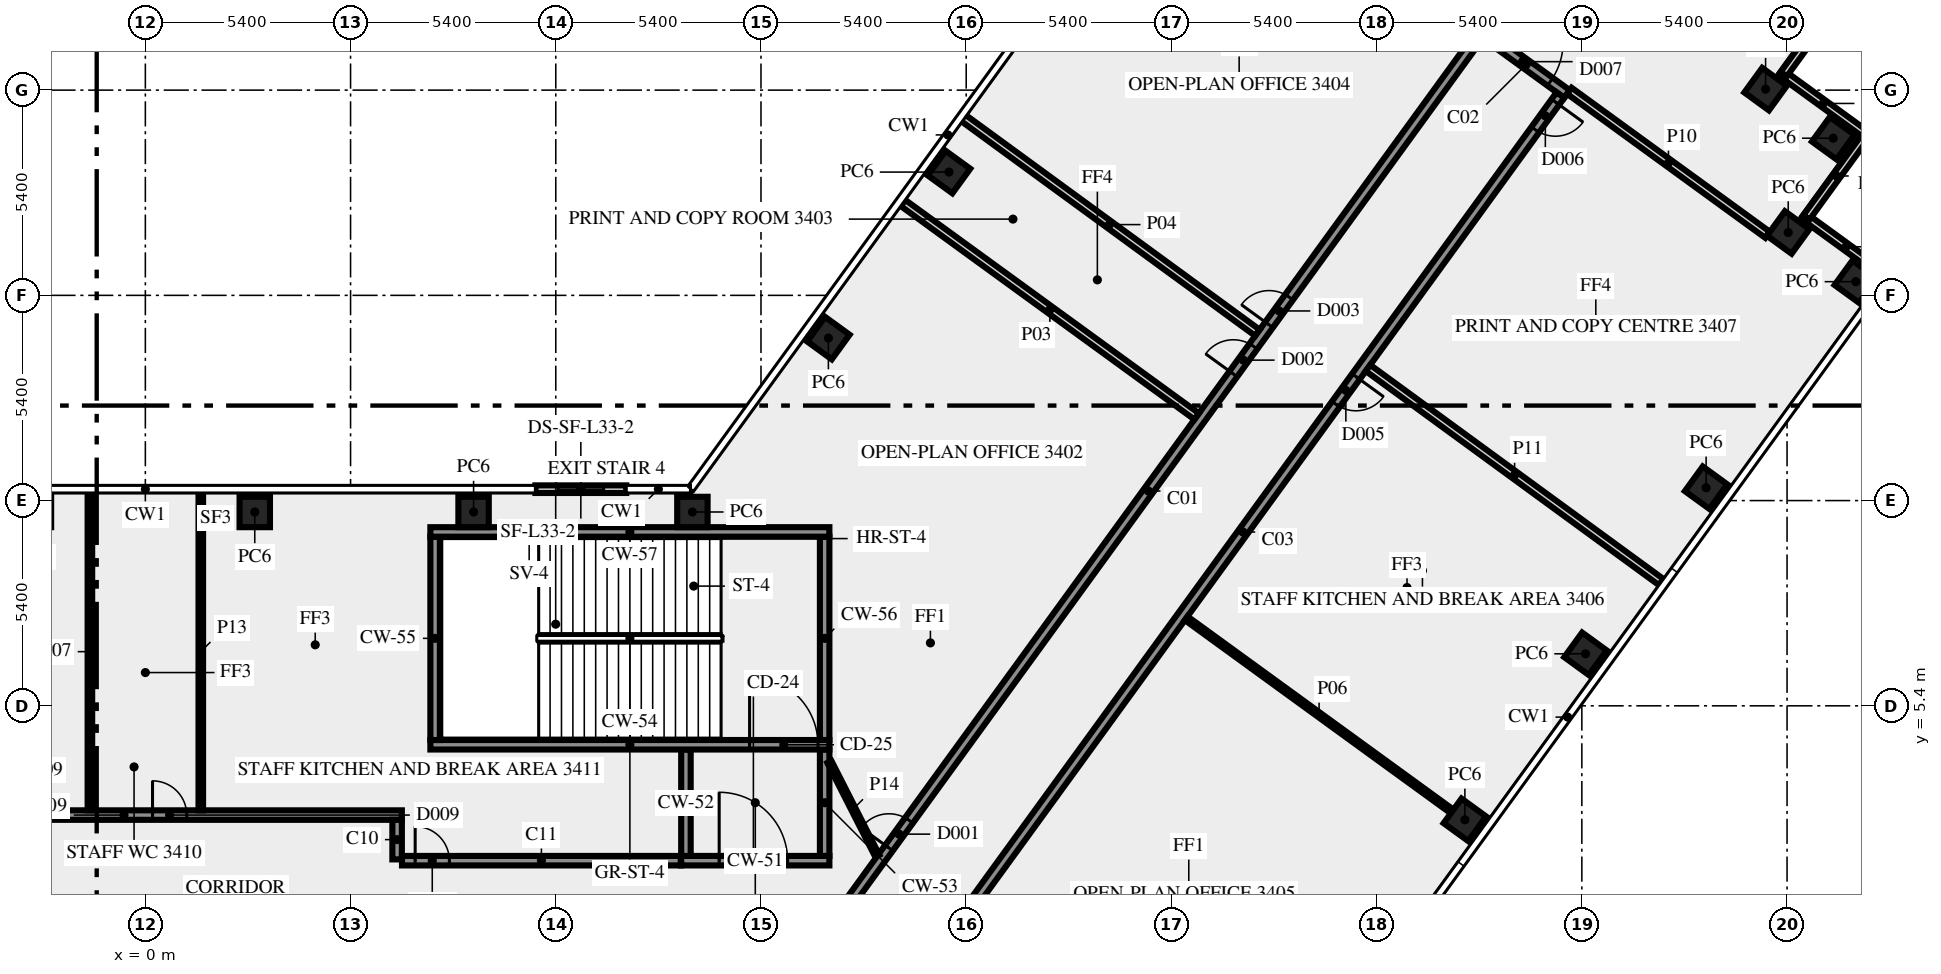
"""IFC4 building model, lengths in metres.
Left out: names, types, materials, properties, quantities, classifications, styles, units other than length and angle.
Written with IfcOpenShell. Run it as: python <this file> out.ifc"""

import sys

from ifc_helpers import new_model, si_unit, direction, frame, frame_2d, origin, origin_2d, place, context, subcontext, project, spatial, rectangle, extrude, element, fill, save


model = new_model("IFC4")
c1 = context("Model", 3, precision=1e-05, world=origin(), true_north=direction((0.0, 1.0)))
c2 = subcontext(c1, "Body", "Model", "MODEL_VIEW")
j1 = project(units=[si_unit("LENGTHUNIT", "METRE"), si_unit("PLANEANGLEUNIT", "RADIAN")], contexts=[c1])
p1 = place(None, origin())
s1 = spatial("IfcSite", under=j1, at=p1, CompositionType="ELEMENT")
p2 = place(p1, origin())
s2 = spatial("IfcBuilding", under=s1, at=p2, CompositionType="ELEMENT")
p3 = place(p2, frame((0.0, 0.0, 148.0)))
s3 = spatial("IfcBuildingStorey", under=s2, at=p3, CompositionType="ELEMENT", Elevation=148.0)
for number, where, z_axis, x_axis in (
    (1, (34.722, 2.4, 0.0), (0.0, 0.0, 1.0), (0.588, 0.809, 0.0)),
    (2, (37.896, 6.769, 0.0), (0.0, 0.0, 1.0), (0.588, 0.809, 0.0)),
    (3, (41.07, 11.137, 0.0), (0.0, 0.0, 1.0), (0.588, 0.809, 0.0)),
    (4, (45.01, 16.56, 0.0), (0.0, 0.0, 1.0), (0.588, 0.809, 0.0)),
    (5, (43.231, 17.854, 0.0), (0.0, 0.0, 1.0), (0.588, 0.809, 0.0)),
    (6, (44.415, 20.335, 0.0), (0.0, 0.0, 1.0), (0.588, 0.809, 0.0)),
    (7, (42.635, 21.626, 0.0), (0.0, 0.0, 1.0), (-0.809, 0.588, 0.0)),
    (8, (21.147, 19.444, 0.0), (0.0, 0.0, 1.0), (-0.588, -0.809, 0.0)),
    (9, (17.974, 15.075, 0.0), (0.0, 0.0, 1.0), (-0.588, -0.809, 0.0)),
    (10, (14.395, 10.5, 0.0), (0.0, 0.0, 1.0), (-1.0, 0.0, 0.0)),
    (11, (8.637, 10.5, 0.0), (0.0, 0.0, 1.0), (-1.0, 0.0, 0.0)),
    (12, (2.879, 10.5, 0.0), (0.0, 0.0, 1.0), (-1.0, 0.0, 0.0)),
):
    element("IfcColumn", number, at=place(p3, frame(where, z_axis=z_axis, x_axis=x_axis)), inside=s3, PredefinedType="COLUMN", context=c2, shape_type="SweptSolid", body=[
        extrude(rectangle(XDim=0.8, YDim=0.8, at=origin_2d()), origin(), (0.0, 0.0, 1.0), 3.65),
    ])
for number, where, z_axis, x_axis in (
    (13, (45.842, 16.685, 0.0), (0.0, 0.0, 1.0), (-0.809, 0.588, 0.0)),
    (14, (43.709, 18.249, 0.0), (0.0, 0.0, 1.0), (0.588, 0.809, 0.0)),
    (15, (45.245, 20.456, 0.0), (0.0, 0.0, 1.0), (-0.809, 0.588, 0.0)),
    (16, (43.113, 22.02, 0.0), (0.0, 0.0, 1.0), (0.588, 0.809, 0.0)),
):
    element("IfcWall", number, at=place(p3, frame(where, z_axis=z_axis, x_axis=x_axis)), inside=s3, PredefinedType="SOLIDWALL", context=c2, shape_type="SweptSolid", body=[
        extrude(rectangle(XDim=2.7, YDim=0.2, at=frame_2d((1.35, 0.0))), origin(), (0.0, 0.0, 1.0), 3.65),
    ])
p4 = place(p3, frame((12.655, 11.1, 0.0), z_axis=(0.0, 0.0, 1.0), x_axis=(-1.0, 0.0, 0.0)))
e17 = element("IfcWall", 17, at=p4, inside=s3, PredefinedType="SOLIDWALL", context=c2, shape_type="SweptSolid", body=[
    extrude(rectangle(XDim=2.392, YDim=0.2, at=frame_2d((1.196, 0.0))), origin(), (0.0, 0.0, 1.0), 3.65),
])
p5 = place(p4, frame((0.596, 0.0, 1.0)))
e18 = element("IfcOpeningElement", 18, at=p5, cuts=e17, PredefinedType="OPENING", context=c2, shape_type="SweptSolid", body=[
    extrude(rectangle(XDim=1.2, YDim=1.2, at=frame_2d((0.6, 0.6))), frame((0.0, 0.11, 0.0), z_axis=(0.0, -1.0, 0.0), x_axis=(1.0, 0.0, 0.0)), (0.0, 0.0, 1.0), 0.22),
])
p6 = place(p3, frame((14.1, 1.325, 0.0), z_axis=(0.0, 0.0, 1.0), x_axis=(1.0, 0.0, 0.0)))
e19 = element("IfcWall", 19, at=p6, inside=s3, PredefinedType="SHEAR", context=c2, shape_type="SweptSolid", body=[
    extrude(rectangle(XDim=3.9, YDim=0.25, at=frame_2d((1.95, 0.0))), origin(), (0.0, 0.0, 1.0), 3.65),
])
p7 = place(p6, frame((1.0, 0.0, 0.0)))
e20 = element("IfcOpeningElement", 20, at=p7, cuts=e19, PredefinedType="OPENING", context=c2, shape_type="SweptSolid", body=[
    extrude(rectangle(XDim=1.8, YDim=2.1, at=frame_2d((0.9, 1.05))), frame((0.0, 0.135, 0.0), z_axis=(0.0, -1.0, 0.0), x_axis=(1.0, 0.0, 0.0)), (0.0, 0.0, 1.0), 0.27),
])
for number, where, z_axis, x_axis in (
    (21, (14.225, 1.45, 0.0), (0.0, 0.0, 1.0), (0.0, 1.0, 0.0)),
    (22, (17.875, 1.45, 0.0), (0.0, 0.0, 1.0), (0.0, 1.0, 0.0)),
):
    element("IfcWall", number, at=place(p3, frame(where, z_axis=z_axis, x_axis=x_axis)), inside=s3, PredefinedType="SHEAR", context=c2, shape_type="SweptSolid", body=[
        extrude(rectangle(XDim=2.8, YDim=0.25, at=frame_2d((1.4, 0.0))), origin(), (0.0, 0.0, 1.0), 3.65),
    ])
p8 = place(p3, frame((7.5, 4.375, 0.0), z_axis=(0.0, 0.0, 1.0), x_axis=(1.0, 0.0, 0.0)))
e23 = element("IfcWall", 23, at=p8, inside=s3, PredefinedType="SHEAR", context=c2, shape_type="SweptSolid", body=[
    extrude(rectangle(XDim=10.5, YDim=0.25, at=frame_2d((5.25, 0.0))), origin(), (0.0, 0.0, 1.0), 3.65),
])
p9 = place(p8, frame((8.4, 0.0, 0.0)))
e24 = element("IfcOpeningElement", 24, at=p9, cuts=e23, PredefinedType="OPENING", context=c2, shape_type="SweptSolid", body=[
    extrude(rectangle(XDim=1.8, YDim=2.1, at=frame_2d((0.9, 1.05))), frame((0.0, 0.135, 0.0), z_axis=(0.0, -1.0, 0.0), x_axis=(1.0, 0.0, 0.0)), (0.0, 0.0, 1.0), 0.27),
])
for number, where, z_axis, x_axis in (
    (25, (7.625, 4.5, 0.0), (0.0, 0.0, 1.0), (0.0, 1.0, 0.0)),
    (26, (17.875, 4.5, 0.0), (0.0, 0.0, 1.0), (0.0, 1.0, 0.0)),
):
    element("IfcWall", number, at=place(p3, frame(where, z_axis=z_axis, x_axis=x_axis)), inside=s3, PredefinedType="SHEAR", context=c2, shape_type="SweptSolid", body=[
        extrude(rectangle(XDim=5.35, YDim=0.25, at=frame_2d((2.675, 0.0))), origin(), (0.0, 0.0, 1.0), 3.65),
    ])
p10 = place(p3, frame((7.5, 9.975, 0.0), z_axis=(0.0, 0.0, 1.0), x_axis=(1.0, 0.0, 0.0)))
e27 = element("IfcWall", 27, at=p10, inside=s3, PredefinedType="SHEAR", context=c2, shape_type="SweptSolid", body=[
    extrude(rectangle(XDim=10.5, YDim=0.25, at=frame_2d((5.25, 0.0))), origin(), (0.0, 0.0, 1.0), 3.65),
])
p11 = place(p10, frame((2.0, 0.0, 1.0)))
e28 = element("IfcOpeningElement", 28, at=p11, cuts=e27, PredefinedType="OPENING", context=c2, shape_type="SweptSolid", body=[
    extrude(rectangle(XDim=1.2, YDim=1.2, at=frame_2d((0.6, 0.6))), frame((0.0, 0.135, 0.0), z_axis=(0.0, -1.0, 0.0), x_axis=(1.0, 0.0, 0.0)), (0.0, 0.0, 1.0), 0.27),
])
p12 = place(p3, frame((17.545, -1.125, 0.0), z_axis=(0.0, 0.0, 1.0), x_axis=(0.587786330937, 0.809016210693, 0.0)))
e29 = element("IfcWall", 29, at=p12, inside=s3, PredefinedType="SOLIDWALL", context=c2, shape_type="SweptSolid", body=[
    extrude(rectangle(XDim=30.103, YDim=0.25, at=frame_2d((15.052, 0.0))), origin(), (0.0, 0.0, 1.0), 3.65),
])
p13 = place(p12, frame((3.441, 0.0, 0.0)))
e30 = element("IfcOpeningElement", 30, at=p13, cuts=e29, PredefinedType="OPENING", context=c2, shape_type="SweptSolid", body=[
    extrude(rectangle(XDim=0.9, YDim=2.1, at=frame_2d((0.45, 1.05))), frame((0.0, 0.135, 0.0), z_axis=(0.0, -1.0, 0.0), x_axis=(1.0, 0.0, 0.0)), (0.0, 0.0, 1.0), 0.27),
])
p14 = place(p12, frame((20.457, 0.0, 0.0)))
e31 = element("IfcOpeningElement", 31, at=p14, cuts=e29, PredefinedType="OPENING", context=c2, shape_type="SweptSolid", body=[
    extrude(rectangle(XDim=0.9, YDim=2.1, at=frame_2d((0.45, 1.05))), frame((0.0, 0.135, 0.0), z_axis=(0.0, -1.0, 0.0), x_axis=(1.0, 0.0, 0.0)), (0.0, 0.0, 1.0), 0.27),
])
p15 = place(p12, frame((18.858, 0.0, 0.0)))
e32 = element("IfcOpeningElement", 32, at=p15, cuts=e29, PredefinedType="OPENING", context=c2, shape_type="SweptSolid", body=[
    extrude(rectangle(XDim=0.9, YDim=2.1, at=frame_2d((0.45, 1.05))), frame((0.0, 0.135, 0.0), z_axis=(0.0, -1.0, 0.0), x_axis=(1.0, 0.0, 0.0)), (0.0, 0.0, 1.0), 0.27),
])
p16 = place(p3, frame((35.267, 23.054, 0.0), z_axis=(0.0, 0.0, 1.0), x_axis=(0.809038743598, -0.587755315891, 0.0)))
e33 = element("IfcWall", 33, at=p16, inside=s3, PredefinedType="SOLIDWALL", context=c2, shape_type="SweptSolid", body=[
    extrude(rectangle(XDim=2.65, YDim=0.25, at=frame_2d((1.325, 0.0))), origin(), (0.0, 0.0, 1.0), 3.65),
])
p17 = place(p16, frame((0.3, 0.0, 0.0)))
e34 = element("IfcOpeningElement", 34, at=p17, cuts=e33, PredefinedType="OPENING", context=c2, shape_type="SweptSolid", body=[
    extrude(rectangle(XDim=1.8, YDim=2.1, at=frame_2d((0.9, 1.05))), frame((0.0, 0.135, 0.0), z_axis=(0.0, -1.0, 0.0), x_axis=(1.0, 0.0, 0.0)), (0.0, 0.0, 1.0), 0.27),
])
p18 = place(p3, frame((37.236, 21.469, 0.0), z_axis=(0.0, 0.0, 1.0), x_axis=(-0.58778344073, -0.809018310549, 0.0)))
e35 = element("IfcWall", 35, at=p18, inside=s3, PredefinedType="SOLIDWALL", context=c2, shape_type="SweptSolid", body=[
    extrude(rectangle(XDim=28.42, YDim=0.25, at=frame_2d((14.21, 0.0))), origin(), (0.0, 0.0, 1.0), 3.65),
])
p19 = place(p18, frame((26.988, 0.0, 0.0)))
e36 = element("IfcOpeningElement", 36, at=p19, cuts=e35, PredefinedType="OPENING", context=c2, shape_type="SweptSolid", body=[
    extrude(rectangle(XDim=0.9, YDim=2.1, at=frame_2d((0.45, 1.05))), frame((0.0, 0.135, 0.0), z_axis=(0.0, -1.0, 0.0), x_axis=(1.0, 0.0, 0.0)), (0.0, 0.0, 1.0), 0.27),
])
p20 = place(p18, frame((0.224, 0.0, 0.0)))
e37 = element("IfcOpeningElement", 37, at=p20, cuts=e35, PredefinedType="OPENING", context=c2, shape_type="SweptSolid", body=[
    extrude(rectangle(XDim=0.9, YDim=2.1, at=frame_2d((0.45, 1.05))), frame((0.0, 0.135, 0.0), z_axis=(0.0, -1.0, 0.0), x_axis=(1.0, 0.0, 0.0)), (0.0, 0.0, 1.0), 0.27),
])
p21 = place(p18, frame((9.155, 0.0, 0.0)))
e38 = element("IfcOpeningElement", 38, at=p21, cuts=e35, PredefinedType="OPENING", context=c2, shape_type="SweptSolid", body=[
    extrude(rectangle(XDim=0.9, YDim=2.1, at=frame_2d((0.45, 1.05))), frame((0.0, 0.135, 0.0), z_axis=(0.0, -1.0, 0.0), x_axis=(1.0, 0.0, 0.0)), (0.0, 0.0, 1.0), 0.27),
])
p22 = place(p3, frame((-4.5, 2.525, 0.0), z_axis=(0.0, 0.0, 1.0), x_axis=(1.0, 0.0, 0.0)))
e39 = element("IfcWall", 39, at=p22, inside=s3, PredefinedType="SOLIDWALL", context=c2, shape_type="SweptSolid", body=[
    extrude(rectangle(XDim=11.25, YDim=0.25, at=frame_2d((5.625, 0.0))), origin(), (0.0, 0.0, 1.0), 3.65),
])
p23 = place(p22, frame((4.689, 0.0, 0.0)))
e40 = element("IfcOpeningElement", 40, at=p23, cuts=e39, PredefinedType="OPENING", context=c2, shape_type="SweptSolid", body=[
    extrude(rectangle(XDim=0.9, YDim=2.1, at=frame_2d((0.45, 1.05))), frame((0.0, 0.135, 0.0), z_axis=(0.0, -1.0, 0.0), x_axis=(1.0, 0.0, 0.0)), (0.0, 0.0, 1.0), 0.27),
])
p24 = place(p3, frame((6.625, 2.4, 0.0), z_axis=(0.0, 0.0, 1.0), x_axis=(0.0, -1.0, 0.0)))
e41 = element("IfcWall", 41, at=p24, inside=s3, PredefinedType="SOLIDWALL", context=c2, shape_type="SweptSolid", body=[
    extrude(rectangle(XDim=1.041, YDim=0.25, at=frame_2d((0.521, 0.0))), origin(), (0.0, 0.0, 1.0), 3.65),
])
p25 = place(p3, frame((6.754, 1.325, 0.0), z_axis=(0.0, 0.0, 1.0), x_axis=(1.0, 0.0, 0.0)))
e42 = element("IfcWall", 42, at=p25, inside=s3, PredefinedType="SOLIDWALL", context=c2, shape_type="SweptSolid", body=[
    extrude(rectangle(XDim=7.336, YDim=0.25, at=frame_2d((3.668, 0.0))), origin(), (0.0, 0.0, 1.0), 3.65),
])
p26 = place(p25, frame((0.346, 0.0, 0.0)))
e43 = element("IfcOpeningElement", 43, at=p26, cuts=e42, PredefinedType="OPENING", context=c2, shape_type="SweptSolid", body=[
    extrude(rectangle(XDim=0.9, YDim=2.1, at=frame_2d((0.45, 1.05))), frame((0.0, 0.135, 0.0), z_axis=(0.0, -1.0, 0.0), x_axis=(1.0, 0.0, 0.0)), (0.0, 0.0, 1.0), 0.27),
])
p27 = place(p3, frame((27.664, 13.016, 0.0), z_axis=(0.0, 0.0, 1.0), x_axis=(-0.80900684162, 0.587799226107, 0.0)))
e44 = element("IfcWall", 44, at=p27, inside=s3, PredefinedType="SOLIDWALL", context=c2, shape_type="SweptSolid", body=[
    extrude(rectangle(XDim=9.55, YDim=0.2, at=frame_2d((4.775, 0.0))), origin(), (0.0, 0.0, 1.0), 2.85),
])
p28 = place(p3, frame((21.469, 20.908, 0.0), z_axis=(0.0, 0.0, 1.0), x_axis=(0.807593618158, -0.589739389824, 0.0)))
e45 = element("IfcWall", 45, at=p28, inside=s3, PredefinedType="SOLIDWALL", context=c2, shape_type="SweptSolid", body=[
    extrude(rectangle(XDim=9.651, YDim=0.2, at=frame_2d((4.826, 0.0))), origin(), (0.0, 0.0, 1.0), 2.85),
])
p29 = place(p3, frame((34.383, 2.622, 0.0), z_axis=(0.0, 0.0, 1.0), x_axis=(-0.809060825193, 0.587724919617, 0.0)))
e46 = element("IfcWall", 46, at=p29, inside=s3, PredefinedType="PARTITIONING", context=c2, shape_type="SweptSolid", body=[
    extrude(rectangle(XDim=8.645, YDim=0.12, at=frame_2d((4.322, 0.0))), origin(), (0.0, 0.0, 1.0), 3.65),
])
p30 = place(p3, frame((-1.459, 2.65, 0.0), z_axis=(0.0, 0.0, 1.0), x_axis=(0.0, 1.0, 0.0)))
e47 = element("IfcWall", 47, at=p30, inside=s3, PredefinedType="PARTITIONING", context=c2, shape_type="SweptSolid", body=[
    extrude(rectangle(XDim=8.35, YDim=0.12, at=frame_2d((4.175, 0.0))), origin(), (0.0, 0.0, 1.0), 2.85),
])
p31 = place(p3, frame((42.686, 17.794, 0.0), z_axis=(0.0, 0.0, 1.0), x_axis=(-0.809017755079, 0.587784205272, 0.0)))
e48 = element("IfcWall", 48, at=p31, inside=s3, PredefinedType="SOLIDWALL", context=c2, shape_type="SweptSolid", body=[
    extrude(rectangle(XDim=6.445, YDim=0.2, at=frame_2d((3.222, 0.0))), origin(), (0.0, 0.0, 1.0), 3.65),
])
p32 = place(p3, frame((32.174, 14.288, 0.0), z_axis=(0.0, 0.0, 1.0), x_axis=(0.807664588563, -0.589642190131, 0.0)))
e49 = element("IfcWall", 49, at=p32, inside=s3, PredefinedType="SOLIDWALL", context=c2, shape_type="SweptSolid", body=[
    extrude(rectangle(XDim=9.55, YDim=0.2, at=frame_2d((4.775, 0.0))), origin(), (0.0, 0.0, 1.0), 2.85),
])
p33 = place(p3, frame((1.459, 11.0, 0.0), z_axis=(0.0, 0.0, 1.0), x_axis=(0.0, -1.0, 0.0)))
e50 = element("IfcWall", 50, at=p33, inside=s3, PredefinedType="PARTITIONING", context=c2, shape_type="SweptSolid", body=[
    extrude(rectangle(XDim=8.35, YDim=0.12, at=frame_2d((4.175, 0.0))), origin(), (0.0, 0.0, 1.0), 2.85),
])
p34 = place(p3, frame((18.0, 3.925, 0.0), z_axis=(0.0, 0.0, 1.0), x_axis=(0.453950796792, -0.891026752736, 0.0)))
e51 = element("IfcWall", 51, at=p34, inside=s3, PredefinedType="PARTITIONING", context=c2, shape_type="SweptSolid", body=[
    extrude(rectangle(XDim=2.778, YDim=0.12, at=frame_2d((1.389, 0.0))), origin(), (0.0, 0.0, 1.0), 3.65),
])
p35 = place(p5, origin())
e52 = element("IfcWindow", 52, at=p35, inside=s3, PartitioningType="SINGLE_PANEL", PredefinedType="WINDOW", context=c2, shape_type="SweptSolid", body=[
    extrude(rectangle(XDim=1.2, YDim=1.2, at=frame_2d((0.6, 0.6))), frame((0.0, 0.03, 0.0), z_axis=(0.0, -1.0, 0.0), x_axis=(1.0, 0.0, 0.0)), (0.0, 0.0, 1.0), 0.06),
])
fill(e18, e52)
p36 = place(p7, origin())
e53 = element("IfcDoor", 53, at=p36, inside=s3, OperationType="DOUBLE_DOOR_SINGLE_SWING", PredefinedType="DOOR", context=c2, shape_type="SweptSolid", body=[
    extrude(rectangle(XDim=1.8, YDim=2.1, at=frame_2d((0.9, 1.05))), frame((0.0, 0.025, 0.0), z_axis=(0.0, -1.0, 0.0), x_axis=(1.0, 0.0, 0.0)), (0.0, 0.0, 1.0), 0.05),
])
fill(e20, e53)
p37 = place(p9, origin())
e54 = element("IfcDoor", 54, at=p37, inside=s3, OperationType="DOUBLE_DOOR_SINGLE_SWING", PredefinedType="DOOR", context=c2, shape_type="SweptSolid", body=[
    extrude(rectangle(XDim=1.8, YDim=2.1, at=frame_2d((0.9, 1.05))), frame((0.0, 0.025, 0.0), z_axis=(0.0, -1.0, 0.0), x_axis=(1.0, 0.0, 0.0)), (0.0, 0.0, 1.0), 0.05),
])
fill(e24, e54)
p38 = place(p11, origin())
e55 = element("IfcWindow", 55, at=p38, inside=s3, PartitioningType="SINGLE_PANEL", PredefinedType="WINDOW", context=c2, shape_type="SweptSolid", body=[
    extrude(rectangle(XDim=1.2, YDim=1.2, at=frame_2d((0.6, 0.6))), frame((0.0, 0.03, 0.0), z_axis=(0.0, -1.0, 0.0), x_axis=(1.0, 0.0, 0.0)), (0.0, 0.0, 1.0), 0.06),
])
fill(e28, e55)
p39 = place(p13, origin())
e56 = element("IfcDoor", 56, at=p39, inside=s3, OperationType="SINGLE_SWING_LEFT", PredefinedType="DOOR", context=c2, shape_type="SweptSolid", body=[
    extrude(rectangle(XDim=0.9, YDim=2.1, at=frame_2d((0.45, 1.05))), frame((0.0, 0.025, 0.0), z_axis=(0.0, -1.0, 0.0), x_axis=(1.0, 0.0, 0.0)), (0.0, 0.0, 1.0), 0.05),
])
fill(e30, e56)
p40 = place(p14, origin())
e57 = element("IfcDoor", 57, at=p40, inside=s3, OperationType="SINGLE_SWING_LEFT", PredefinedType="DOOR", context=c2, shape_type="SweptSolid", body=[
    extrude(rectangle(XDim=0.9, YDim=2.1, at=frame_2d((0.45, 1.05))), frame((0.0, 0.025, 0.0), z_axis=(0.0, -1.0, 0.0), x_axis=(1.0, 0.0, 0.0)), (0.0, 0.0, 1.0), 0.05),
])
fill(e31, e57)
p41 = place(p15, origin())
e58 = element("IfcDoor", 58, at=p41, inside=s3, OperationType="SINGLE_SWING_RIGHT", PredefinedType="DOOR", context=c2, shape_type="SweptSolid", body=[
    extrude(rectangle(XDim=0.9, YDim=2.1, at=frame_2d((0.45, 1.05))), frame((0.0, 0.025, 0.0), z_axis=(0.0, -1.0, 0.0), x_axis=(1.0, 0.0, 0.0)), (0.0, 0.0, 1.0), 0.05),
])
fill(e32, e58)
p42 = place(p20, origin())
e59 = element("IfcDoor", 59, at=p42, inside=s3, OperationType="SINGLE_SWING_LEFT", PredefinedType="DOOR", context=c2, shape_type="SweptSolid", body=[
    extrude(rectangle(XDim=0.9, YDim=2.1, at=frame_2d((0.45, 1.05))), frame((0.0, 0.025, 0.0), z_axis=(0.0, -1.0, 0.0), x_axis=(1.0, 0.0, 0.0)), (0.0, 0.0, 1.0), 0.05),
])
fill(e37, e59)
p43 = place(p17, origin())
e60 = element("IfcDoor", 60, at=p43, inside=s3, OperationType="DOUBLE_DOOR_SINGLE_SWING", PredefinedType="DOOR", context=c2, shape_type="SweptSolid", body=[
    extrude(rectangle(XDim=1.8, YDim=2.1, at=frame_2d((0.9, 1.05))), frame((0.0, 0.025, 0.0), z_axis=(0.0, -1.0, 0.0), x_axis=(1.0, 0.0, 0.0)), (0.0, 0.0, 1.0), 0.05),
])
fill(e34, e60)
p44 = place(p21, origin())
e61 = element("IfcDoor", 61, at=p44, inside=s3, OperationType="SINGLE_SWING_LEFT", PredefinedType="DOOR", context=c2, shape_type="SweptSolid", body=[
    extrude(rectangle(XDim=0.9, YDim=2.1, at=frame_2d((0.45, 1.05))), frame((0.0, 0.025, 0.0), z_axis=(0.0, -1.0, 0.0), x_axis=(1.0, 0.0, 0.0)), (0.0, 0.0, 1.0), 0.05),
])
fill(e38, e61)
p45 = place(p26, origin())
e62 = element("IfcDoor", 62, at=p45, inside=s3, OperationType="SINGLE_SWING_LEFT", PredefinedType="DOOR", context=c2, shape_type="SweptSolid", body=[
    extrude(rectangle(XDim=0.9, YDim=2.1, at=frame_2d((0.45, 1.05))), frame((0.0, 0.025, 0.0), z_axis=(0.0, -1.0, 0.0), x_axis=(1.0, 0.0, 0.0)), (0.0, 0.0, 1.0), 0.05),
])
fill(e43, e62)
p46 = place(p23, origin())
e63 = element("IfcDoor", 63, at=p46, inside=s3, OperationType="SINGLE_SWING_RIGHT", PredefinedType="DOOR", context=c2, shape_type="SweptSolid", body=[
    extrude(rectangle(XDim=0.9, YDim=2.1, at=frame_2d((0.45, 1.05))), frame((0.0, 0.025, 0.0), z_axis=(0.0, -1.0, 0.0), x_axis=(1.0, 0.0, 0.0)), (0.0, 0.0, 1.0), 0.05),
])
fill(e40, e63)
save(model, sys.argv[1])
